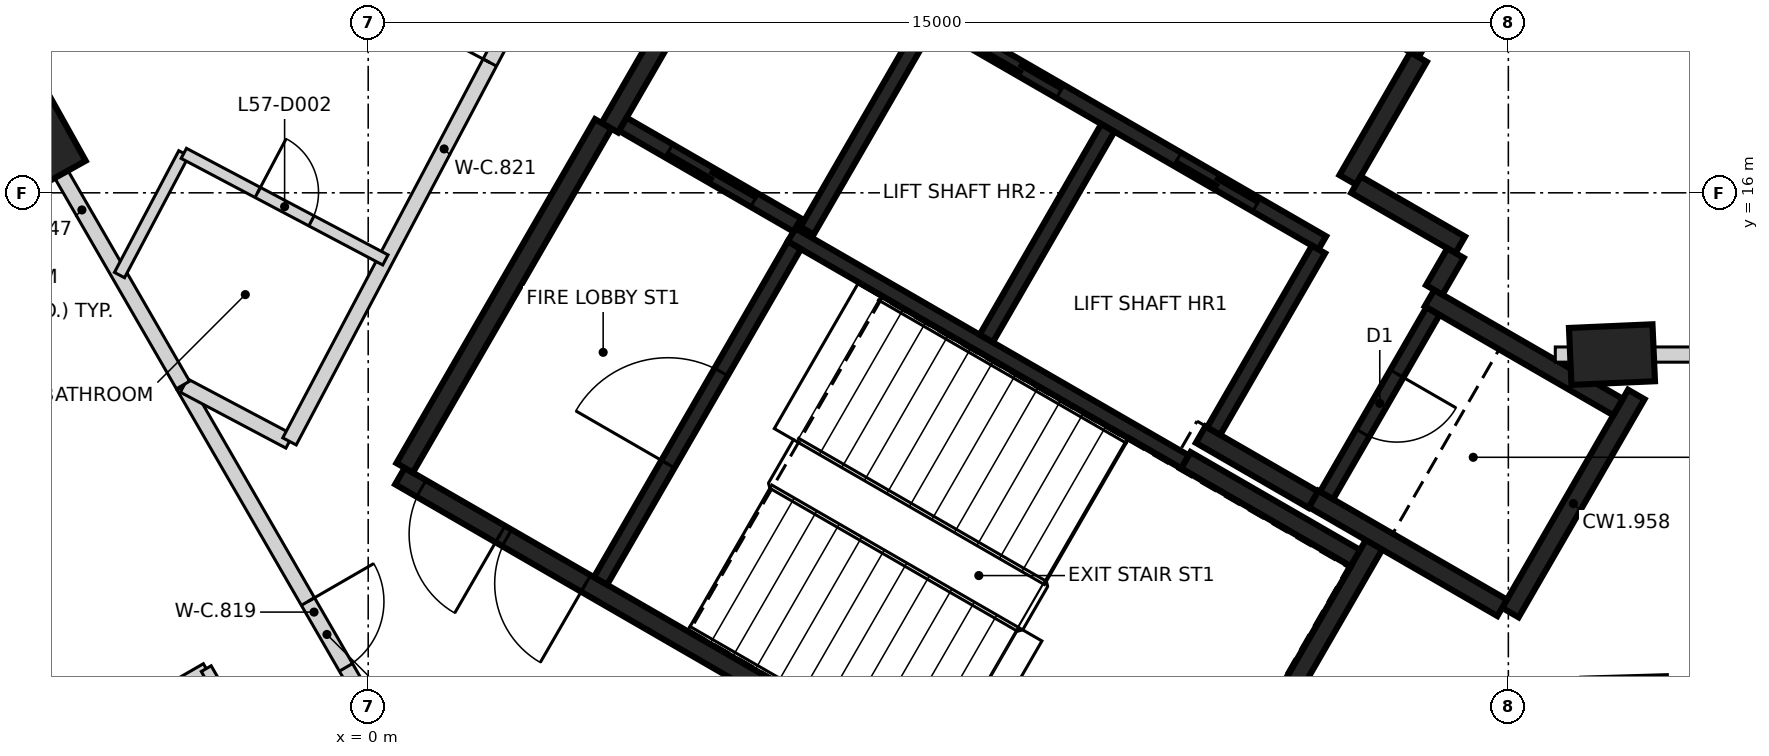
"""IFC4 building model, lengths in metres.
Left out: names, types, materials, properties, quantities, classifications, styles, units other than length and angle.
Written with IfcOpenShell. Run it as: python <this file> out.ifc"""

import sys

from ifc_helpers import new_model, si_unit, direction, frame, frame_2d, origin, origin_2d, place, context, subcontext, project, spatial, rectangle, extrude, element, fill, save


model = new_model("IFC4")
c1 = context("Model", 3, precision=1e-05, world=origin(), true_north=direction((0.0, 1.0)))
c2 = subcontext(c1, "Body", "Model", "MODEL_VIEW")
j1 = project(units=[si_unit("LENGTHUNIT", "METRE"), si_unit("PLANEANGLEUNIT", "RADIAN")], contexts=[c1])
p1 = place(None, origin())
s1 = spatial("IfcSite", under=j1, at=p1, CompositionType="ELEMENT")
p2 = place(p1, origin())
s2 = spatial("IfcBuilding", under=s1, at=p2, CompositionType="ELEMENT")
p3 = place(p2, frame((0.0, 0.0, 228.6)))
s3 = spatial("IfcBuildingStorey", under=s2, at=p3, CompositionType="ELEMENT", Elevation=228.6)
for number, where, z_axis, x_axis in (
    (1, (16.363, 13.872, -0.35), (0.0, 0.0, 1.0), (0.999, 0.044, 0.0)),
    (2, (-4.312, 16.719, -0.35), (0.0, 0.0, 1.0), (-0.487, 0.873, 0.0)),
):
    element("IfcColumn", number, at=place(p3, frame(where, z_axis=z_axis, x_axis=x_axis)), inside=s3, PredefinedType="COLUMN", context=c2, shape_type="SweptSolid", body=[
        extrude(rectangle(XDim=1.1, YDim=0.75, at=origin_2d()), origin(), (0.0, 0.0, 1.0), 3.6),
    ])
p4 = place(p3, frame((10.42, 6.498, 0.0), z_axis=(0.0, 0.0, 1.0), x_axis=(-0.866021906294, 0.500006057782, 0.0)))
e3 = element("IfcWall", 3, at=p4, inside=s3, PredefinedType="SHEAR", context=c2, shape_type="SweptSolid", body=[
    extrude(rectangle(XDim=11.55, YDim=0.25, at=frame_2d((5.775, 0.0))), origin(), (0.0, 0.0, 1.0), 3.25),
])
p5 = place(p4, frame((10.025, 0.0, 0.0)))
e4 = element("IfcOpeningElement", 4, at=p5, cuts=e3, PredefinedType="OPENING", context=c2, shape_type="SweptSolid", body=[
    extrude(rectangle(XDim=1.2, YDim=2.1, at=frame_2d((0.6, 1.05))), frame((0.0, 0.135, 0.0), z_axis=(0.0, -1.0, 0.0), x_axis=(1.0, 0.0, 0.0)), (0.0, 0.0, 1.0), 0.27),
])
p6 = place(p4, frame((8.725, 0.0, 0.0)))
e5 = element("IfcOpeningElement", 5, at=p6, cuts=e3, PredefinedType="OPENING", context=c2, shape_type="SweptSolid", body=[
    extrude(rectangle(XDim=1.2, YDim=2.1, at=frame_2d((0.6, 1.05))), frame((0.0, 0.135, 0.0), z_axis=(0.0, -1.0, 0.0), x_axis=(1.0, 0.0, 0.0)), (0.0, 0.0, 1.0), 0.27),
])
p7 = place(p3, frame((6.304, 22.269, 0.0), z_axis=(0.0, 0.0, 1.0), x_axis=(0.866022959057, -0.500004234368, 0.0)))
e6 = element("IfcWall", 6, at=p7, inside=s3, PredefinedType="SHEAR", context=c2, shape_type="SweptSolid", body=[
    extrude(rectangle(XDim=8.75, YDim=0.25, at=frame_2d((4.375, 0.0))), origin(), (0.0, 0.0, 1.0), 3.25),
])
p8 = place(p3, frame((3.179, 16.856, 0.0), z_axis=(0.0, 0.0, 1.0), x_axis=(0.500001955336, 0.866024274868, 0.0)))
e7 = element("IfcWall", 7, at=p8, inside=s3, PredefinedType="SHEAR", context=c2, shape_type="SweptSolid", body=[
    extrude(rectangle(XDim=6.125, YDim=0.25, at=frame_2d((3.062, 0.0))), origin(), (0.0, 0.0, 1.0), 3.25),
])
p9 = place(p8, frame((4.263, 0.0, 0.0)))
e8 = element("IfcOpeningElement", 8, at=p9, cuts=e7, PredefinedType="OPENING", context=c2, shape_type="SweptSolid", body=[
    extrude(rectangle(XDim=1.0, YDim=2.1, at=frame_2d((0.5, 1.05))), frame((0.0, 0.135, 0.0), z_axis=(0.0, -1.0, 0.0), x_axis=(1.0, 0.0, 0.0)), (0.0, 0.0, 1.0), 0.27),
])
p10 = place(p3, frame((0.48, 12.381, 0.0), z_axis=(0.0, 0.0, 1.0), x_axis=(0.49999885962, 0.866026062182, 0.0)))
e9 = element("IfcWall", 9, at=p10, inside=s3, PredefinedType="SHEAR", context=c2, shape_type="SweptSolid", body=[
    extrude(rectangle(XDim=5.225, YDim=0.25, at=frame_2d((2.612, 0.0))), origin(), (0.0, 0.0, 1.0), 3.25),
])
p11 = place(p3, frame((13.238, 11.378, 0.0), z_axis=(0.0, 0.0, 1.0), x_axis=(-0.500008851346, -0.866020293397, 0.0)))
e10 = element("IfcWall", 10, at=p11, inside=s3, PredefinedType="SHEAR", context=c2, shape_type="SweptSolid", body=[
    extrude(rectangle(XDim=5.51, YDim=0.25, at=frame_2d((2.755, 0.0))), origin(), (0.0, 0.0, 1.0), 3.25),
])
p12 = place(p3, frame((16.684, 13.347, 0.0), z_axis=(0.0, 0.0, 1.0), x_axis=(-0.499998874531, -0.866026053573, 0.0)))
e11 = element("IfcWall", 11, at=p12, inside=s3, PredefinedType="SHEAR", context=c2, shape_type="SweptSolid", body=[
    extrude(rectangle(XDim=3.313, YDim=0.25, at=frame_2d((1.656, 0.0))), origin(), (0.0, 0.0, 1.0), 3.25),
])
p13 = place(p3, frame((14.918, 10.54, 0.0), z_axis=(0.0, 0.0, 1.0), x_axis=(-0.866063538972, 0.499933942099, 0.0)))
e12 = element("IfcWall", 12, at=p13, inside=s3, PredefinedType="SHEAR", context=c2, shape_type="SweptSolid", body=[
    extrude(rectangle(XDim=2.865, YDim=0.25, at=frame_2d((1.432, 0.0))), origin(), (0.0, 0.0, 1.0), 3.25),
])
p14 = place(p3, frame((13.963, 14.614, 0.0), z_axis=(0.0, 0.0, 1.0), x_axis=(0.866042235819, -0.499970844928, 0.0)))
e13 = element("IfcWall", 13, at=p14, inside=s3, PredefinedType="SHEAR", context=c2, shape_type="SweptSolid", body=[
    extrude(rectangle(XDim=2.865, YDim=0.25, at=frame_2d((1.432, 0.0))), origin(), (0.0, 0.0, 1.0), 3.25),
])
p15 = place(p3, frame((10.757, 12.481, 0.0), z_axis=(0.0, 0.0, 1.0), x_axis=(0.866022940537, -0.500004266446, 0.0)))
e14 = element("IfcWall", 14, at=p15, inside=s3, PredefinedType="SHEAR", context=c2, shape_type="SweptSolid", body=[
    extrude(rectangle(XDim=2.575, YDim=0.25, at=frame_2d((1.287, 0.0))), origin(), (0.0, 0.0, 1.0), 3.25),
])
p16 = place(p3, frame((13.819, 17.785, 0.0), z_axis=(0.0, 0.0, 1.0), x_axis=(-0.500039802285, -0.866002422705, 0.0)))
e15 = element("IfcWall", 15, at=p16, inside=s3, PredefinedType="SHEAR", context=c2, shape_type="SweptSolid", body=[
    extrude(rectangle(XDim=1.865, YDim=0.25, at=frame_2d((0.932, 0.0))), origin(), (0.0, 0.0, 1.0), 3.25),
])
p17 = place(p3, frame((12.433, 11.964, 0.0), z_axis=(0.0, 0.0, 1.0), x_axis=(-0.866038183914, 0.499977863513, 0.0)))
e16 = element("IfcWall", 16, at=p17, inside=s3, PredefinedType="SHEAR", context=c2, shape_type="SweptSolid", body=[
    extrude(rectangle(XDim=1.71, YDim=0.25, at=frame_2d((0.855, 0.0))), origin(), (0.0, 0.0, 1.0), 3.25),
])
p18 = place(p3, frame((12.995, 16.108, 0.0), z_axis=(0.0, 0.0, 1.0), x_axis=(0.866044474677, -0.49996696679, 0.0)))
e17 = element("IfcWall", 17, at=p18, inside=s3, PredefinedType="SHEAR", context=c2, shape_type="SweptSolid", body=[
    extrude(rectangle(XDim=1.584, YDim=0.25, at=frame_2d((0.792, 0.0))), origin(), (0.0, 0.0, 1.0), 3.25),
])
p19 = place(p3, frame((14.305, 15.207, 0.0), z_axis=(0.0, 0.0, 1.0), x_axis=(-0.499848422343, -0.866112899501, 0.0)))
e18 = element("IfcWall", 18, at=p19, inside=s3, PredefinedType="SHEAR", context=c2, shape_type="SweptSolid", body=[
    extrude(rectangle(XDim=0.559, YDim=0.25, at=frame_2d((0.28, 0.0))), origin(), (0.0, 0.0, 1.0), 3.25),
])
p20 = place(p3, frame((12.552, 15.342, 0.0), z_axis=(0.0, 0.0, 1.0), x_axis=(-0.866030299012, 0.499991521122, 0.0)))
e19 = element("IfcWall", 19, at=p20, inside=s3, PredefinedType="SHEAR", context=c2, shape_type="SweptSolid", body=[
    extrude(rectangle(XDim=6.1, YDim=0.2, at=frame_2d((3.05, 0.0))), origin(), (0.0, 0.0, 1.0), 3.25),
])
p21 = place(p20, frame((1.0, 0.0, 0.0)))
e20 = element("IfcOpeningElement", 20, at=p21, cuts=e19, PredefinedType="OPENING", context=c2, shape_type="SweptSolid", body=[
    extrude(rectangle(XDim=1.2, YDim=2.1, at=frame_2d((0.6, 1.05))), frame((0.0, 0.11, 0.0), z_axis=(0.0, -1.0, 0.0), x_axis=(1.0, 0.0, 0.0)), (0.0, 0.0, 1.0), 0.22),
])
p22 = place(p20, frame((3.982, 0.0, 0.0)))
e21 = element("IfcOpeningElement", 21, at=p22, cuts=e19, PredefinedType="OPENING", context=c2, shape_type="SweptSolid", body=[
    extrude(rectangle(XDim=1.2, YDim=2.1, at=frame_2d((0.6, 1.05))), frame((0.0, 0.11, 0.0), z_axis=(0.0, -1.0, 0.0), x_axis=(1.0, 0.0, 0.0)), (0.0, 0.0, 1.0), 0.22),
])
p23 = place(p3, frame((10.743, 12.46, 0.0), z_axis=(0.0, 0.0, 1.0), x_axis=(-0.866018848283, 0.500011354289, 0.0)))
e22 = element("IfcWall", 22, at=p23, inside=s3, PredefinedType="SHEAR", context=c2, shape_type="SweptSolid", body=[
    extrude(rectangle(XDim=5.974, YDim=0.2, at=frame_2d((2.987, 0.0))), origin(), (0.0, 0.0, 1.0), 3.25),
])
p24 = place(p3, frame((3.057, 10.895, 0.0), z_axis=(0.0, 0.0, 1.0), x_axis=(0.500027839223, 0.866009330205, 0.0)))
e23 = element("IfcWall", 23, at=p24, inside=s3, PredefinedType="SHEAR", context=c2, shape_type="SweptSolid", body=[
    extrude(rectangle(XDim=5.098, YDim=0.2, at=frame_2d((2.549, 0.0))), origin(), (0.0, 0.0, 1.0), 3.25),
])
p25 = place(p24, frame((1.774, 0.0, 0.0)))
e24 = element("IfcOpeningElement", 24, at=p25, cuts=e23, PredefinedType="OPENING", context=c2, shape_type="SweptSolid", body=[
    extrude(rectangle(XDim=1.4, YDim=2.1, at=frame_2d((0.7, 1.05))), frame((0.0, 0.11, 0.0), z_axis=(0.0, -1.0, 0.0), x_axis=(1.0, 0.0, 0.0)), (0.0, 0.0, 1.0), 0.22),
])
p26 = place(p3, frame((8.132, 14.084, 0.0), z_axis=(0.0, 0.0, 1.0), x_axis=(0.500030834389, 0.86600760081, 0.0)))
e25 = element("IfcWall", 25, at=p26, inside=s3, PredefinedType="SHEAR", context=c2, shape_type="SweptSolid", body=[
    extrude(rectangle(XDim=3.198, YDim=0.2, at=frame_2d((1.599, 0.0))), origin(), (0.0, 0.0, 1.0), 3.25),
])
p27 = place(p3, frame((14.008, 14.442, 0.0), z_axis=(0.0, 0.0, 1.0), x_axis=(-0.499986818241, -0.866033014143, 0.0)))
e26 = element("IfcWall", 26, at=p27, inside=s3, PredefinedType="SHEAR", context=c2, shape_type="SweptSolid", body=[
    extrude(rectangle(XDim=2.798, YDim=0.2, at=frame_2d((1.399, 0.0))), origin(), (0.0, 0.0, 1.0), 3.25),
])
p28 = place(p27, frame((0.949, 0.0, 0.0)))
e27 = element("IfcOpeningElement", 27, at=p28, cuts=e26, PredefinedType="OPENING", context=c2, shape_type="SweptSolid", body=[
    extrude(rectangle(XDim=0.9, YDim=2.1, at=frame_2d((0.45, 1.05))), frame((0.0, 0.11, 0.0), z_axis=(0.0, -1.0, 0.0), x_axis=(1.0, 0.0, 0.0)), (0.0, 0.0, 1.0), 0.22),
])
p29 = place(p3, frame((12.502, 15.255, 0.0), z_axis=(0.0, 0.0, 1.0), x_axis=(-0.499965018551, -0.866045599391, 0.0)))
e28 = element("IfcWall", 28, at=p29, inside=s3, PredefinedType="SHEAR", context=c2, shape_type="SweptSolid", body=[
    extrude(rectangle(XDim=2.759, YDim=0.2, at=frame_2d((1.379, 0.0))), origin(), (0.0, 0.0, 1.0), 3.25),
])
p30 = place(p3, frame((7.324, 18.187, 0.0), z_axis=(0.0, 0.0, 1.0), x_axis=(-0.499967891604, -0.866043940782, 0.0)))
e29 = element("IfcWall", 29, at=p30, inside=s3, PredefinedType="SHEAR", context=c2, shape_type="SweptSolid", body=[
    extrude(rectangle(XDim=3.1, YDim=0.2, at=frame_2d((1.55, 0.0))), origin(), (0.0, 0.0, 1.0), 3.25),
])
p31 = place(p3, frame((5.646, 15.576, 0.0), z_axis=(0.0, 0.0, 1.0), x_axis=(-0.866018407898, 0.500012117035, 0.0)))
e30 = element("IfcWall", 30, at=p31, inside=s3, PredefinedType="SHEAR", context=c2, shape_type="SweptSolid", body=[
    extrude(rectangle(XDim=2.651, YDim=0.2, at=frame_2d((1.325, 0.0))), origin(), (0.0, 0.0, 1.0), 3.25),
])
p32 = place(p31, frame((0.652, 0.0, 0.0)))
e31 = element("IfcOpeningElement", 31, at=p32, cuts=e30, PredefinedType="OPENING", context=c2, shape_type="SweptSolid", body=[
    extrude(rectangle(XDim=1.3, YDim=2.1, at=frame_2d((0.65, 1.05))), frame((0.0, 0.11, 0.0), z_axis=(0.0, -1.0, 0.0), x_axis=(1.0, 0.0, 0.0)), (0.0, 0.0, 1.0), 0.22),
])
p33 = place(p3, frame((-2.43, 13.459, 0.0), z_axis=(0.0, 0.0, 1.0), x_axis=(0.499957265187, -0.866050075334, 0.0)))
e32 = element("IfcWall", 32, at=p33, inside=s3, PredefinedType="PARTITIONING", context=c2, shape_type="SweptSolid", body=[
    extrude(rectangle(XDim=6.87, YDim=0.2, at=frame_2d((3.435, 0.0))), origin(), (0.0, 0.0, 1.0), 3.25),
])
p34 = place(p33, frame((3.275, 0.0, 0.0)))
e33 = element("IfcOpeningElement", 33, at=p34, cuts=e32, PredefinedType="OPENING", context=c2, shape_type="SweptSolid", body=[
    extrude(rectangle(XDim=1.0, YDim=2.1, at=frame_2d((0.5, 1.05))), frame((0.0, 0.11, 0.0), z_axis=(0.0, -1.0, 0.0), x_axis=(1.0, 0.0, 0.0)), (0.0, 0.0, 1.0), 0.22),
])
p35 = place(p3, frame((-2.425, 13.465, 0.0), z_axis=(0.0, 0.0, 1.0), x_axis=(0.883874806572, -0.467723557572, 0.0)))
e34 = element("IfcWall", 34, at=p35, inside=s3, PredefinedType="PARTITIONING", context=c2, shape_type="SweptSolid", body=[
    extrude(rectangle(XDim=1.572, YDim=0.2, at=frame_2d((0.786, 0.0))), origin(), (0.0, 0.0, 1.0), 3.25),
])
p36 = place(p3, frame((-1.035, 12.73, 0.0), z_axis=(0.0, 0.0, 1.0), x_axis=(0.46738248691, 0.884055208078, 0.0)))
e35 = element("IfcWall", 35, at=p36, inside=s3, PredefinedType="PARTITIONING", context=c2, shape_type="SweptSolid", body=[
    extrude(rectangle(XDim=8.705, YDim=0.2, at=frame_2d((4.352, 0.0))), origin(), (0.0, 0.0, 1.0), 3.25),
])
p37 = place(p36, frame((5.638, 0.0, 0.0)))
e36 = element("IfcOpeningElement", 36, at=p37, cuts=e35, PredefinedType="OPENING", context=c2, shape_type="SweptSolid", body=[
    extrude(rectangle(XDim=0.95, YDim=2.1, at=frame_2d((0.475, 1.05))), frame((0.0, 0.11, 0.0), z_axis=(0.0, -1.0, 0.0), x_axis=(1.0, 0.0, 0.0)), (0.0, 0.0, 1.0), 0.22),
])
p38 = place(p3, frame((-9.119, 15.795, 0.0), z_axis=(0.0, 0.0, 1.0), x_axis=(0.50001601051, -0.866016159915, 0.0)))
e37 = element("IfcWall", 37, at=p38, inside=s3, PredefinedType="PARTITIONING", context=c2, shape_type="SweptSolid", body=[
    extrude(rectangle(XDim=12.238, YDim=0.2, at=frame_2d((6.119, 0.0))), origin(), (0.0, 0.0, 1.0), 3.25),
])
p39 = place(p3, frame((-5.097, 18.078, 0.0), z_axis=(0.0, 0.0, 1.0), x_axis=(0.50004820116, -0.865997573043, 0.0)))
e38 = element("IfcWall", 38, at=p39, inside=s3, PredefinedType="PARTITIONING", context=c2, shape_type="SweptSolid", body=[
    extrude(rectangle(XDim=5.32, YDim=0.2, at=frame_2d((2.66, 0.0))), origin(), (0.0, 0.0, 1.0), 3.25),
])
p40 = place(p3, frame((15.618, 13.872, 0.0), z_axis=(0.0, 0.0, 1.0), x_axis=(1.0, 0.0, 0.0)))
e39 = element("IfcWall", 39, at=p40, inside=s3, PredefinedType="PARTITIONING", context=c2, shape_type="SweptSolid", body=[
    extrude(rectangle(XDim=2.316, YDim=0.2, at=frame_2d((1.158, 0.0))), origin(), (0.0, 0.0, 1.0), 3.25),
])
p41 = place(p3, frame((-4.75, 8.227, 0.0), z_axis=(0.0, 0.0, 1.0), x_axis=(0.865893821749, 0.500227837548, 0.0)))
e40 = element("IfcWall", 40, at=p41, inside=s3, PredefinedType="PARTITIONING", context=c2, shape_type="SweptSolid", body=[
    extrude(rectangle(XDim=3.024, YDim=0.15, at=frame_2d((1.512, 0.0))), origin(), (0.0, 0.0, 1.0), 3.25),
])
p42 = place(p3, frame((-3.272, 14.918, 0.0), z_axis=(0.0, 0.0, 1.0), x_axis=(0.467162796658, 0.884171319043, 0.0)))
e41 = element("IfcWall", 41, at=p42, inside=s3, PredefinedType="PARTITIONING", context=c2, shape_type="SweptSolid", body=[
    extrude(rectangle(XDim=1.811, YDim=0.15, at=frame_2d((0.905, 0.0))), origin(), (0.0, 0.0, 1.0), 3.25),
])
p43 = place(p3, frame((-2.426, 16.519, 0.0), z_axis=(0.0, 0.0, 1.0), x_axis=(0.884056991815, -0.467379112952, 0.0)))
e42 = element("IfcWall", 42, at=p43, inside=s3, PredefinedType="PARTITIONING", context=c2, shape_type="SweptSolid", body=[
    extrude(rectangle(XDim=3.0, YDim=0.15, at=frame_2d((1.5, 0.0))), origin(), (0.0, 0.0, 1.0), 3.25),
])
p44 = place(p43, frame((1.1, 0.0, 0.0)))
e43 = element("IfcOpeningElement", 43, at=p44, cuts=e42, PredefinedType="OPENING", context=c2, shape_type="SweptSolid", body=[
    extrude(rectangle(XDim=0.8, YDim=2.1, at=frame_2d((0.4, 1.05))), frame((0.0, 0.085, 0.0), z_axis=(0.0, -1.0, 0.0), x_axis=(1.0, 0.0, 0.0)), (0.0, 0.0, 1.0), 0.17),
])
p45 = place(p3, frame((-2.131, 9.74, 0.0), z_axis=(0.0, 0.0, 1.0), x_axis=(0.500010275428, -0.866019471182, 0.0)))
e44 = element("IfcWall", 44, at=p45, inside=s3, PredefinedType="PARTITIONING", context=c2, shape_type="SweptSolid", body=[
    extrude(rectangle(XDim=3.5, YDim=0.15, at=frame_2d((1.75, 0.0))), origin(), (0.0, 0.0, 1.0), 3.25),
])
p46 = place(p45, frame((1.35, 0.0, 0.0)))
e45 = element("IfcOpeningElement", 45, at=p46, cuts=e44, PredefinedType="OPENING", context=c2, shape_type="SweptSolid", body=[
    extrude(rectangle(XDim=0.8, YDim=2.1, at=frame_2d((0.4, 1.05))), frame((0.0, 0.085, 0.0), z_axis=(0.0, -1.0, 0.0), x_axis=(1.0, 0.0, 0.0)), (0.0, 0.0, 1.0), 0.17),
])
p47 = place(p32, origin())
e46 = element("IfcDoor", 46, at=p47, inside=s3, OperationType="SLIDING_TO_LEFT", PredefinedType="DOOR", context=c2, shape_type="SweptSolid", body=[
    extrude(rectangle(XDim=1.3, YDim=2.1, at=frame_2d((0.65, 1.05))), frame((0.0, 0.025, 0.0), z_axis=(0.0, -1.0, 0.0), x_axis=(1.0, 0.0, 0.0)), (0.0, 0.0, 1.0), 0.05),
])
fill(e31, e46)
p48 = place(p21, origin())
e47 = element("IfcDoor", 47, at=p48, inside=s3, OperationType="DOUBLE_DOOR_SLIDING", PredefinedType="DOOR", context=c2, shape_type="SweptSolid", body=[
    extrude(rectangle(XDim=1.2, YDim=2.1, at=frame_2d((0.6, 1.05))), frame((0.0, 0.025, 0.0), z_axis=(0.0, -1.0, 0.0), x_axis=(1.0, 0.0, 0.0)), (0.0, 0.0, 1.0), 0.05),
])
fill(e20, e47)
p49 = place(p22, origin())
e48 = element("IfcDoor", 48, at=p49, inside=s3, OperationType="DOUBLE_DOOR_SLIDING", PredefinedType="DOOR", context=c2, shape_type="SweptSolid", body=[
    extrude(rectangle(XDim=1.2, YDim=2.1, at=frame_2d((0.6, 1.05))), frame((0.0, 0.025, 0.0), z_axis=(0.0, -1.0, 0.0), x_axis=(1.0, 0.0, 0.0)), (0.0, 0.0, 1.0), 0.05),
])
fill(e21, e48)
p50 = place(p5, origin())
e49 = element("IfcDoor", 49, at=p50, inside=s3, OperationType="SINGLE_SWING_LEFT", PredefinedType="DOOR", context=c2, shape_type="SweptSolid", body=[
    extrude(rectangle(XDim=1.2, YDim=2.1, at=frame_2d((0.6, 1.05))), frame((0.0, 0.025, 0.0), z_axis=(0.0, -1.0, 0.0), x_axis=(1.0, 0.0, 0.0)), (0.0, 0.0, 1.0), 0.05),
])
fill(e4, e49)
p51 = place(p6, origin())
e50 = element("IfcDoor", 50, at=p51, inside=s3, OperationType="SINGLE_SWING_RIGHT", PredefinedType="DOOR", context=c2, shape_type="SweptSolid", body=[
    extrude(rectangle(XDim=1.2, YDim=2.1, at=frame_2d((0.6, 1.05))), frame((0.0, 0.025, 0.0), z_axis=(0.0, -1.0, 0.0), x_axis=(1.0, 0.0, 0.0)), (0.0, 0.0, 1.0), 0.05),
])
fill(e5, e50)
p52 = place(p25, origin())
e51 = element("IfcDoor", 51, at=p52, inside=s3, OperationType="SINGLE_SWING_LEFT", PredefinedType="DOOR", context=c2, shape_type="SweptSolid", body=[
    extrude(rectangle(XDim=1.4, YDim=2.1, at=frame_2d((0.7, 1.05))), frame((0.0, 0.025, 0.0), z_axis=(0.0, -1.0, 0.0), x_axis=(1.0, 0.0, 0.0)), (0.0, 0.0, 1.0), 0.05),
])
fill(e24, e51)
p53 = place(p28, origin())
e52 = element("IfcDoor", 52, at=p53, inside=s3, OperationType="SINGLE_SWING_RIGHT", PredefinedType="DOOR", context=c2, shape_type="SweptSolid", body=[
    extrude(rectangle(XDim=0.9, YDim=2.1, at=frame_2d((0.45, 1.05))), frame((0.0, 0.025, 0.0), z_axis=(0.0, -1.0, 0.0), x_axis=(1.0, 0.0, 0.0)), (0.0, 0.0, 1.0), 0.05),
])
fill(e27, e52)
p54 = place(p37, frame((0.95, 0.0, 0.0), z_axis=(0.0, 0.0, 1.0), x_axis=(-1.0, 0.0, 0.0)))
e53 = element("IfcDoor", 53, at=p54, inside=s3, OperationType="SINGLE_SWING_LEFT", PredefinedType="DOOR", context=c2, shape_type="SweptSolid", body=[
    extrude(rectangle(XDim=0.95, YDim=2.1, at=frame_2d((0.475, 1.05))), frame((0.0, 0.025, 0.0), z_axis=(0.0, -1.0, 0.0), x_axis=(1.0, 0.0, 0.0)), (0.0, 0.0, 1.0), 0.05),
])
fill(e36, e53)
p55 = place(p44, origin())
e54 = element("IfcDoor", 54, at=p55, inside=s3, OperationType="SINGLE_SWING_LEFT", PredefinedType="DOOR", context=c2, shape_type="SweptSolid", body=[
    extrude(rectangle(XDim=0.8, YDim=2.1, at=frame_2d((0.4, 1.05))), frame((0.0, 0.025, 0.0), z_axis=(0.0, -1.0, 0.0), x_axis=(1.0, 0.0, 0.0)), (0.0, 0.0, 1.0), 0.05),
])
fill(e43, e54)
p56 = place(p34, frame((1.0, 0.0, 0.0), z_axis=(0.0, 0.0, 1.0), x_axis=(-1.0, 0.0, 0.0)))
e55 = element("IfcDoor", 55, at=p56, inside=s3, OperationType="SINGLE_SWING_LEFT", PredefinedType="DOOR", context=c2, shape_type="SweptSolid", body=[
    extrude(rectangle(XDim=1.0, YDim=2.1, at=frame_2d((0.5, 1.05))), frame((0.0, 0.025, 0.0), z_axis=(0.0, -1.0, 0.0), x_axis=(1.0, 0.0, 0.0)), (0.0, 0.0, 1.0), 0.05),
])
fill(e33, e55)
save(model, sys.argv[1])
